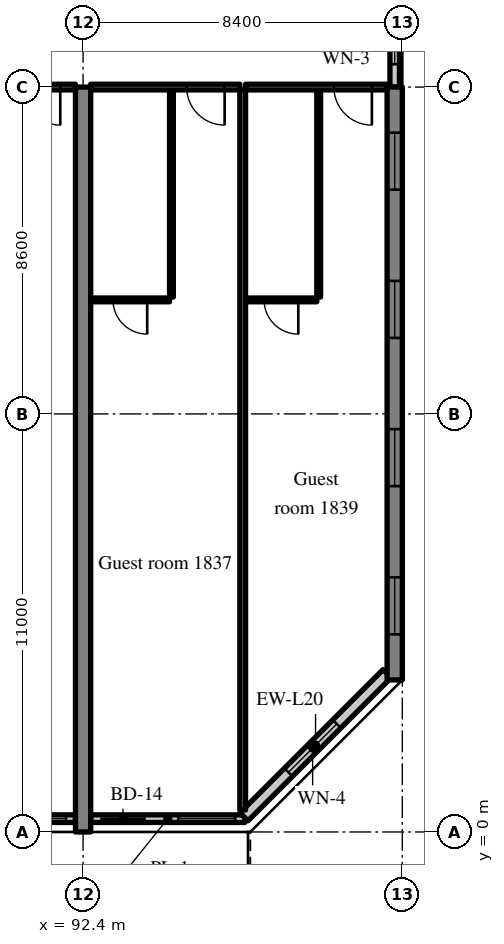
"""IFC4 building model, lengths in metres.
Left out: names, types, materials, properties, quantities, classifications, styles, units other than length and angle.
Written with IfcOpenShell. Run it as: python <this file> out.ifc"""

import sys

from ifc_helpers import new_model, si_unit, direction, frame, frame_2d, origin, place, context, subcontext, project, spatial, rectangle, extrude, source, transform, mapped, element, fill, save


model = new_model("IFC4")
c1 = context("Model", 3, precision=1e-05, world=origin(), true_north=direction((0.0, 1.0)))
c2 = subcontext(c1, "Body", "Model", "MODEL_VIEW")
j1 = project(units=[si_unit("LENGTHUNIT", "METRE"), si_unit("PLANEANGLEUNIT", "RADIAN")], contexts=[c1])
p1 = place(None, origin())
s1 = spatial("IfcSite", under=j1, at=p1, CompositionType="ELEMENT")
p2 = place(p1, origin())
s2 = spatial("IfcBuilding", under=s1, at=p2, CompositionType="ELEMENT")
p3 = place(p2, frame((0.0, 0.0, 77.2)))
s3 = spatial("IfcBuildingStorey", under=s2, at=p3, CompositionType="ELEMENT", Elevation=77.2)
m1 = source(origin(), c2, "Body", "SweptSolid", [
    extrude(rectangle(XDim=19.6, YDim=0.4, at=frame_2d((9.8, 0.0))), origin(), (0.0, 0.0, 1.0), 3.52),
])
p4 = place(p3, frame((92.4, 0.0, 0.0), z_axis=(0.0, 0.0, 1.0), x_axis=(0.0, 1.0, 0.0)))
e1 = element("IfcWall", 1, at=p4, inside=s3, PredefinedType="SHEAR", context=c2, shape_type="MappedRepresentation", body=[
    mapped(m1, transform((0.0, 0.0, 0.0), scale=1.0)),
])
m2 = source(origin(), c2, "Body", "SweptSolid", [
    extrude(rectangle(XDim=15.6, YDim=0.4, at=frame_2d((7.8, 0.0))), origin(), (0.0, 0.0, 1.0), 3.52),
])
p5 = place(p3, frame((100.6, 4.0, 0.0), z_axis=(0.0, 0.0, 1.0), x_axis=(0.0, 1.0, 0.0)))
e2 = element("IfcWall", 2, at=p5, inside=s3, PredefinedType="SHEAR", context=c2, shape_type="MappedRepresentation", body=[
    mapped(m2, transform((0.0, 0.0, 0.0), scale=1.0)),
])
m3 = source(origin(), c2, "Body", "SweptSolid", [
    extrude(rectangle(XDim=1.5, YDim=1.5, at=frame_2d((0.75, 0.75))), frame((0.0, 0.21, 0.0), z_axis=(0.0, -1.0, 0.0), x_axis=(1.0, 0.0, 0.0)), (0.0, 0.0, 1.0), 0.42),
])
p6 = place(p5, frame((1.2, 0.0, 0.9)))
e3 = element("IfcOpeningElement", 3, at=p6, cuts=e2, PredefinedType="OPENING", context=c2, shape_type="MappedRepresentation", body=[
    mapped(m3, transform((0.0, 0.0, 0.0), scale=1.0)),
])
p7 = place(p5, frame((5.1, 0.0, 0.9)))
e4 = element("IfcOpeningElement", 4, at=p7, cuts=e2, PredefinedType="OPENING", context=c2, shape_type="MappedRepresentation", body=[
    mapped(m3, transform((0.0, 0.0, 0.0), scale=1.0)),
])
p8 = place(p5, frame((9.0, 0.0, 0.9)))
e5 = element("IfcOpeningElement", 5, at=p8, cuts=e2, PredefinedType="OPENING", context=c2, shape_type="MappedRepresentation", body=[
    mapped(m3, transform((0.0, 0.0, 0.0), scale=1.0)),
])
p9 = place(p5, frame((12.9, 0.0, 0.9)))
e6 = element("IfcOpeningElement", 6, at=p9, cuts=e2, PredefinedType="OPENING", context=c2, shape_type="MappedRepresentation", body=[
    mapped(m3, transform((0.0, 0.0, 0.0), scale=1.0)),
])
m4 = source(origin(), c2, "Body", "SweptSolid", [
    extrude(rectangle(XDim=3.6, YDim=0.2, at=frame_2d((1.8, 0.0))), origin(), (0.0, 0.0, 1.0), 2.82),
])
p10 = place(p3, frame((88.6, 0.35, 0.0), z_axis=(0.0, 0.0, 1.0), x_axis=(1.0, 0.0, 0.0)))
e7 = element("IfcWall", 7, at=p10, inside=s3, PredefinedType="SOLIDWALL", context=c2, shape_type="MappedRepresentation", body=[
    mapped(m4, transform((0.0, 0.0, 0.0), scale=1.0)),
])
m5 = source(origin(), c2, "Body", "SweptSolid", [
    extrude(rectangle(XDim=1.2, YDim=2.4, at=frame_2d((0.6, 1.2))), frame((0.0, 0.11, 0.0), z_axis=(0.0, -1.0, 0.0), x_axis=(1.0, 0.0, 0.0)), (0.0, 0.0, 1.0), 0.22),
])
p11 = place(p10, frame((0.25, 0.0, 0.0)))
e8 = element("IfcOpeningElement", 8, at=p11, cuts=e7, PredefinedType="OPENING", context=c2, shape_type="MappedRepresentation", body=[
    mapped(m5, transform((0.0, 0.0, 0.0), scale=1.0)),
])
m6 = source(origin(), c2, "Body", "SweptSolid", [
    extrude(rectangle(XDim=1.5, YDim=1.5, at=frame_2d((0.75, 0.75))), frame((0.0, 0.11, 0.0), z_axis=(0.0, -1.0, 0.0), x_axis=(1.0, 0.0, 0.0)), (0.0, 0.0, 1.0), 0.22),
])
p12 = place(p10, frame((1.85, 0.0, 0.9)))
e9 = element("IfcOpeningElement", 9, at=p12, cuts=e7, PredefinedType="OPENING", context=c2, shape_type="MappedRepresentation", body=[
    mapped(m6, transform((0.0, 0.0, 0.0), scale=1.0)),
])
m7 = source(origin(), c2, "Body", "SweptSolid", [
    extrude(rectangle(XDim=4.055, YDim=0.2, at=frame_2d((2.027, 0.0))), origin(), (0.0, 0.0, 1.0), 2.82),
])
p13 = place(p3, frame((92.6, 0.35, 0.0), z_axis=(0.0, 0.0, 1.0), x_axis=(1.0, 0.0, 0.0)))
e10 = element("IfcWall", 10, at=p13, inside=s3, PredefinedType="SOLIDWALL", context=c2, shape_type="MappedRepresentation", body=[
    mapped(m7, transform((0.0, 0.0, 0.0), scale=1.0)),
])
p14 = place(p13, frame((0.25, 0.0, 0.0)))
e11 = element("IfcOpeningElement", 11, at=p14, cuts=e10, PredefinedType="OPENING", context=c2, shape_type="MappedRepresentation", body=[
    mapped(m5, transform((0.0, 0.0, 0.0), scale=1.0)),
])
p15 = place(p13, frame((2.305, 0.0, 0.9)))
e12 = element("IfcOpeningElement", 12, at=p15, cuts=e10, PredefinedType="OPENING", context=c2, shape_type="MappedRepresentation", body=[
    mapped(m6, transform((0.0, 0.0, 0.0), scale=1.0)),
])
m8 = source(origin(), c2, "Body", "SweptSolid", [
    extrude(rectangle(XDim=5.326, YDim=0.3, at=frame_2d((2.663, 0.0))), origin(), (0.0, 0.0, 1.0), 3.52),
])
p16 = place(p3, frame((96.634, 0.4, 0.0), z_axis=(0.0, 0.0, 1.0), x_axis=(0.707083859269, 0.707129702361, 0.0)))
e13 = element("IfcWall", 13, at=p16, inside=s3, PredefinedType="SOLIDWALL", context=c2, shape_type="MappedRepresentation", body=[
    mapped(m8, transform((0.0, 0.0, 0.0), scale=1.0)),
])
m9 = source(origin(), c2, "Body", "SweptSolid", [
    extrude(rectangle(XDim=1.8, YDim=1.5, at=frame_2d((0.9, 0.75))), frame((0.0, 0.16, 0.0), z_axis=(0.0, -1.0, 0.0), x_axis=(1.0, 0.0, 0.0)), (0.0, 0.0, 1.0), 0.32),
])
p17 = place(p16, frame((1.654, 0.0, 0.9)))
e14 = element("IfcOpeningElement", 14, at=p17, cuts=e13, PredefinedType="OPENING", context=c2, shape_type="MappedRepresentation", body=[
    mapped(m9, transform((0.0, 0.0, 0.0), scale=1.0)),
])
m10 = source(origin(), c2, "Body", "SweptSolid", [
    extrude(rectangle(XDim=2.4, YDim=0.25, at=frame_2d((1.2, 0.0))), origin(), (0.0, 0.0, 1.0), 2.62),
])
p18 = place(p3, frame((100.6, 19.6, 0.0), z_axis=(0.0, 0.0, 1.0), x_axis=(0.0, 1.0, 0.0)))
e15 = element("IfcWall", 15, at=p18, inside=s3, PredefinedType="SOLIDWALL", context=c2, shape_type="MappedRepresentation", body=[
    mapped(m10, transform((0.0, 0.0, 0.0), scale=1.0)),
])
m11 = source(origin(), c2, "Body", "SweptSolid", [
    extrude(rectangle(XDim=1.2, YDim=1.5, at=frame_2d((0.6, 0.75))), frame((0.0, 0.135, 0.0), z_axis=(0.0, -1.0, 0.0), x_axis=(1.0, 0.0, 0.0)), (0.0, 0.0, 1.0), 0.27),
])
p19 = place(p18, frame((0.6, 0.0, 0.9)))
e16 = element("IfcOpeningElement", 16, at=p19, cuts=e15, PredefinedType="OPENING", context=c2, shape_type="MappedRepresentation", body=[
    mapped(m11, transform((0.0, 0.0, 0.0), scale=1.0)),
])
m12 = source(origin(), c2, "Body", "SweptSolid", [
    extrude(rectangle(XDim=8.0, YDim=0.15, at=frame_2d((4.0, 0.0))), origin(), (0.0, 0.0, 1.0), 2.82),
])
p20 = place(p3, frame((84.2, 19.6, 0.0), z_axis=(0.0, 0.0, 1.0), x_axis=(1.0, 0.0, 0.0)))
e17 = element("IfcWall", 17, at=p20, inside=s3, PredefinedType="PARTITIONING", context=c2, shape_type="MappedRepresentation", body=[
    mapped(m12, transform((0.0, 0.0, 0.0), scale=1.0)),
])
m13 = source(origin(), c2, "Body", "SweptSolid", [
    extrude(rectangle(XDim=1.0, YDim=2.1, at=frame_2d((0.5, 1.05))), frame((0.0, 0.085, 0.0), z_axis=(0.0, -1.0, 0.0), x_axis=(1.0, 0.0, 0.0)), (0.0, 0.0, 1.0), 0.17),
])
p21 = place(p20, frame((6.6, 0.0, 0.0)))
e18 = element("IfcOpeningElement", 18, at=p21, cuts=e17, PredefinedType="OPENING", context=c2, shape_type="MappedRepresentation", body=[
    mapped(m13, transform((0.0, 0.0, 0.0), scale=1.0)),
])
m14 = source(origin(), c2, "Body", "SweptSolid", [
    extrude(rectangle(XDim=5.45, YDim=0.1, at=frame_2d((2.725, 0.0))), origin(), (0.0, 0.0, 1.0), 3.52),
])
p22 = place(p3, frame((94.725, 14.075, 0.0), z_axis=(0.0, 0.0, 1.0), x_axis=(0.0, 1.0, 0.0)))
e19 = element("IfcWall", 19, at=p22, inside=s3, PredefinedType="PARTITIONING", context=c2, shape_type="MappedRepresentation", body=[
    mapped(m14, transform((0.0, 0.0, 0.0), scale=1.0)),
])
m15 = source(origin(), c2, "Body", "SweptSolid", [
    extrude(rectangle(XDim=2.075, YDim=0.1, at=frame_2d((1.038, 0.0))), origin(), (0.0, 0.0, 1.0), 3.52),
])
p23 = place(p3, frame((92.6, 14.0, 0.0), z_axis=(0.0, 0.0, 1.0), x_axis=(1.0, 0.0, 0.0)))
e20 = element("IfcWall", 20, at=p23, inside=s3, PredefinedType="PARTITIONING", context=c2, shape_type="MappedRepresentation", body=[
    mapped(m15, transform((0.0, 0.0, 0.0), scale=1.0)),
])
m16 = source(origin(), c2, "Body", "SweptSolid", [
    extrude(rectangle(XDim=0.9, YDim=2.1, at=frame_2d((0.45, 1.05))), frame((0.0, 0.06, 0.0), z_axis=(0.0, -1.0, 0.0), x_axis=(1.0, 0.0, 0.0)), (0.0, 0.0, 1.0), 0.12),
])
p24 = place(p23, frame((0.587, 0.0, 0.0)))
e21 = element("IfcOpeningElement", 21, at=p24, cuts=e20, PredefinedType="OPENING", context=c2, shape_type="MappedRepresentation", body=[
    mapped(m16, transform((0.0, 0.0, 0.0), scale=1.0)),
])
m17 = source(origin(), c2, "Body", "SweptSolid", [
    extrude(rectangle(XDim=3.925, YDim=0.15, at=frame_2d((1.962, 0.0))), origin(), (0.0, 0.0, 1.0), 2.82),
])
p25 = place(p3, frame((92.6, 19.6, 0.0), z_axis=(0.0, 0.0, 1.0), x_axis=(1.0, 0.0, 0.0)))
e22 = element("IfcWall", 22, at=p25, inside=s3, PredefinedType="PARTITIONING", context=c2, shape_type="MappedRepresentation", body=[
    mapped(m17, transform((0.0, 0.0, 0.0), scale=1.0)),
])
p26 = place(p25, frame((2.525, 0.0, 0.0)))
e23 = element("IfcOpeningElement", 23, at=p26, cuts=e22, PredefinedType="OPENING", context=c2, shape_type="MappedRepresentation", body=[
    mapped(m13, transform((0.0, 0.0, 0.0), scale=1.0)),
])
p27 = place(p3, frame((98.6, 14.075, 0.0), z_axis=(0.0, 0.0, 1.0), x_axis=(0.0, 1.0, 0.0)))
e24 = element("IfcWall", 24, at=p27, inside=s3, PredefinedType="PARTITIONING", context=c2, shape_type="MappedRepresentation", body=[
    mapped(m14, transform((0.0, 0.0, 0.0), scale=1.0)),
])
m18 = source(origin(), c2, "Body", "SweptSolid", [
    extrude(rectangle(XDim=1.875, YDim=0.1, at=frame_2d((0.938, 0.0))), origin(), (0.0, 0.0, 1.0), 3.52),
])
p28 = place(p3, frame((96.675, 14.0, 0.0), z_axis=(0.0, 0.0, 1.0), x_axis=(1.0, 0.0, 0.0)))
e25 = element("IfcWall", 25, at=p28, inside=s3, PredefinedType="PARTITIONING", context=c2, shape_type="MappedRepresentation", body=[
    mapped(m18, transform((0.0, 0.0, 0.0), scale=1.0)),
])
p29 = place(p28, frame((0.488, 0.0, 0.0)))
e26 = element("IfcOpeningElement", 26, at=p29, cuts=e25, PredefinedType="OPENING", context=c2, shape_type="MappedRepresentation", body=[
    mapped(m16, transform((0.0, 0.0, 0.0), scale=1.0)),
])
m19 = source(origin(), c2, "Body", "SweptSolid", [
    extrude(rectangle(XDim=3.725, YDim=0.15, at=frame_2d((1.862, 0.0))), origin(), (0.0, 0.0, 1.0), 2.82),
])
p30 = place(p3, frame((96.675, 19.6, 0.0), z_axis=(0.0, 0.0, 1.0), x_axis=(1.0, 0.0, 0.0)))
e27 = element("IfcWall", 27, at=p30, inside=s3, PredefinedType="PARTITIONING", context=c2, shape_type="MappedRepresentation", body=[
    mapped(m19, transform((0.0, 0.0, 0.0), scale=1.0)),
])
p31 = place(p30, frame((2.325, 0.0, 0.0)))
e28 = element("IfcOpeningElement", 28, at=p31, cuts=e27, PredefinedType="OPENING", context=c2, shape_type="MappedRepresentation", body=[
    mapped(m13, transform((0.0, 0.0, 0.0), scale=1.0)),
])
m20 = source(origin(), c2, "Body", "SweptSolid", [
    extrude(rectangle(XDim=18.947, YDim=0.15, at=frame_2d((9.474, 0.0))), origin(), (0.0, 0.0, 1.0), 3.52),
])
p32 = place(p3, frame((96.6, 0.578, 0.0), z_axis=(0.0, 0.0, 1.0), x_axis=(0.0, 1.0, 0.0)))
e29 = element("IfcWall", 29, at=p32, inside=s3, PredefinedType="PARTITIONING", context=c2, shape_type="MappedRepresentation", body=[
    mapped(m20, transform((0.0, 0.0, 0.0), scale=1.0)),
])
m21 = source(origin(), c2, "Body", "SweptSolid", [
    extrude(rectangle(XDim=1.5, YDim=1.5, at=frame_2d((0.75, 0.75))), frame((0.0, 0.03, 0.0), z_axis=(0.0, -1.0, 0.0), x_axis=(1.0, 0.0, 0.0)), (0.0, 0.0, 1.0), 0.06),
])
p33 = place(p12, origin())
e30 = element("IfcWindow", 30, at=p33, inside=s3, PartitioningType="SINGLE_PANEL", PredefinedType="WINDOW", context=c2, shape_type="MappedRepresentation", body=[
    mapped(m21, transform((0.0, 0.0, 0.0), scale=1.0)),
])
fill(e9, e30)
m22 = source(origin(), c2, "Body", "SweptSolid", [
    extrude(rectangle(XDim=1.2, YDim=2.4, at=frame_2d((0.6, 1.2))), frame((0.0, 0.025, 0.0), z_axis=(0.0, -1.0, 0.0), x_axis=(1.0, 0.0, 0.0)), (0.0, 0.0, 1.0), 0.05),
])
p34 = place(p14, origin())
e31 = element("IfcDoor", 31, at=p34, inside=s3, OperationType="SLIDING_TO_RIGHT", PredefinedType="DOOR", context=c2, shape_type="MappedRepresentation", body=[
    mapped(m22, transform((0.0, 0.0, 0.0), scale=1.0)),
])
fill(e11, e31)
p35 = place(p15, origin())
e32 = element("IfcWindow", 32, at=p35, inside=s3, PartitioningType="SINGLE_PANEL", PredefinedType="WINDOW", context=c2, shape_type="MappedRepresentation", body=[
    mapped(m21, transform((0.0, 0.0, 0.0), scale=1.0)),
])
fill(e12, e32)
m23 = source(origin(), c2, "Body", "SweptSolid", [
    extrude(rectangle(XDim=1.8, YDim=1.5, at=frame_2d((0.9, 0.75))), frame((0.0, 0.03, 0.0), z_axis=(0.0, -1.0, 0.0), x_axis=(1.0, 0.0, 0.0)), (0.0, 0.0, 1.0), 0.06),
])
p36 = place(p17, origin())
e33 = element("IfcWindow", 33, at=p36, inside=s3, PartitioningType="SINGLE_PANEL", PredefinedType="WINDOW", context=c2, shape_type="MappedRepresentation", body=[
    mapped(m23, transform((0.0, 0.0, 0.0), scale=1.0)),
])
fill(e14, e33)
p37 = place(p6, origin())
e34 = element("IfcWindow", 34, at=p37, inside=s3, PartitioningType="SINGLE_PANEL", PredefinedType="WINDOW", context=c2, shape_type="MappedRepresentation", body=[
    mapped(m21, transform((0.0, 0.0, 0.0), scale=1.0)),
])
fill(e3, e34)
p38 = place(p7, origin())
e35 = element("IfcWindow", 35, at=p38, inside=s3, PartitioningType="SINGLE_PANEL", PredefinedType="WINDOW", context=c2, shape_type="MappedRepresentation", body=[
    mapped(m21, transform((0.0, 0.0, 0.0), scale=1.0)),
])
fill(e4, e35)
p39 = place(p8, origin())
e36 = element("IfcWindow", 36, at=p39, inside=s3, PartitioningType="SINGLE_PANEL", PredefinedType="WINDOW", context=c2, shape_type="MappedRepresentation", body=[
    mapped(m21, transform((0.0, 0.0, 0.0), scale=1.0)),
])
fill(e5, e36)
p40 = place(p9, origin())
e37 = element("IfcWindow", 37, at=p40, inside=s3, PartitioningType="SINGLE_PANEL", PredefinedType="WINDOW", context=c2, shape_type="MappedRepresentation", body=[
    mapped(m21, transform((0.0, 0.0, 0.0), scale=1.0)),
])
fill(e6, e37)
m24 = source(origin(), c2, "Body", "SweptSolid", [
    extrude(rectangle(XDim=1.2, YDim=1.5, at=frame_2d((0.6, 0.75))), frame((0.0, 0.03, 0.0), z_axis=(0.0, -1.0, 0.0), x_axis=(1.0, 0.0, 0.0)), (0.0, 0.0, 1.0), 0.06),
])
p41 = place(p19, origin())
e38 = element("IfcWindow", 38, at=p41, inside=s3, PartitioningType="SINGLE_PANEL", PredefinedType="WINDOW", context=c2, shape_type="MappedRepresentation", body=[
    mapped(m24, transform((0.0, 0.0, 0.0), scale=1.0)),
])
fill(e16, e38)
m25 = source(origin(), c2, "Body", "SweptSolid", [
    extrude(rectangle(XDim=1.0, YDim=2.1, at=frame_2d((0.5, 1.05))), frame((0.0, 0.025, 0.0), z_axis=(0.0, -1.0, 0.0), x_axis=(1.0, 0.0, 0.0)), (0.0, 0.0, 1.0), 0.05),
])
p42 = place(p21, origin())
e39 = element("IfcDoor", 39, at=p42, inside=s3, OperationType="SINGLE_SWING_RIGHT", PredefinedType="DOOR", context=c2, shape_type="MappedRepresentation", body=[
    mapped(m25, transform((0.0, 0.0, 0.0), scale=1.0)),
])
fill(e18, e39)
m26 = source(origin(), c2, "Body", "SweptSolid", [
    extrude(rectangle(XDim=0.9, YDim=2.1, at=frame_2d((0.45, 1.05))), frame((0.0, 0.025, 0.0), z_axis=(0.0, -1.0, 0.0), x_axis=(1.0, 0.0, 0.0)), (0.0, 0.0, 1.0), 0.05),
])
p43 = place(p24, origin())
e40 = element("IfcDoor", 40, at=p43, inside=s3, OperationType="SINGLE_SWING_RIGHT", PredefinedType="DOOR", context=c2, shape_type="MappedRepresentation", body=[
    mapped(m26, transform((0.0, 0.0, 0.0), scale=1.0)),
])
fill(e21, e40)
p44 = place(p26, origin())
e41 = element("IfcDoor", 41, at=p44, inside=s3, OperationType="SINGLE_SWING_RIGHT", PredefinedType="DOOR", context=c2, shape_type="MappedRepresentation", body=[
    mapped(m25, transform((0.0, 0.0, 0.0), scale=1.0)),
])
fill(e23, e41)
p45 = place(p29, origin())
e42 = element("IfcDoor", 42, at=p45, inside=s3, OperationType="SINGLE_SWING_RIGHT", PredefinedType="DOOR", context=c2, shape_type="MappedRepresentation", body=[
    mapped(m26, transform((0.0, 0.0, 0.0), scale=1.0)),
])
fill(e26, e42)
p46 = place(p31, origin())
e43 = element("IfcDoor", 43, at=p46, inside=s3, OperationType="SINGLE_SWING_RIGHT", PredefinedType="DOOR", context=c2, shape_type="MappedRepresentation", body=[
    mapped(m25, transform((0.0, 0.0, 0.0), scale=1.0)),
])
fill(e28, e43)
save(model, sys.argv[1])
